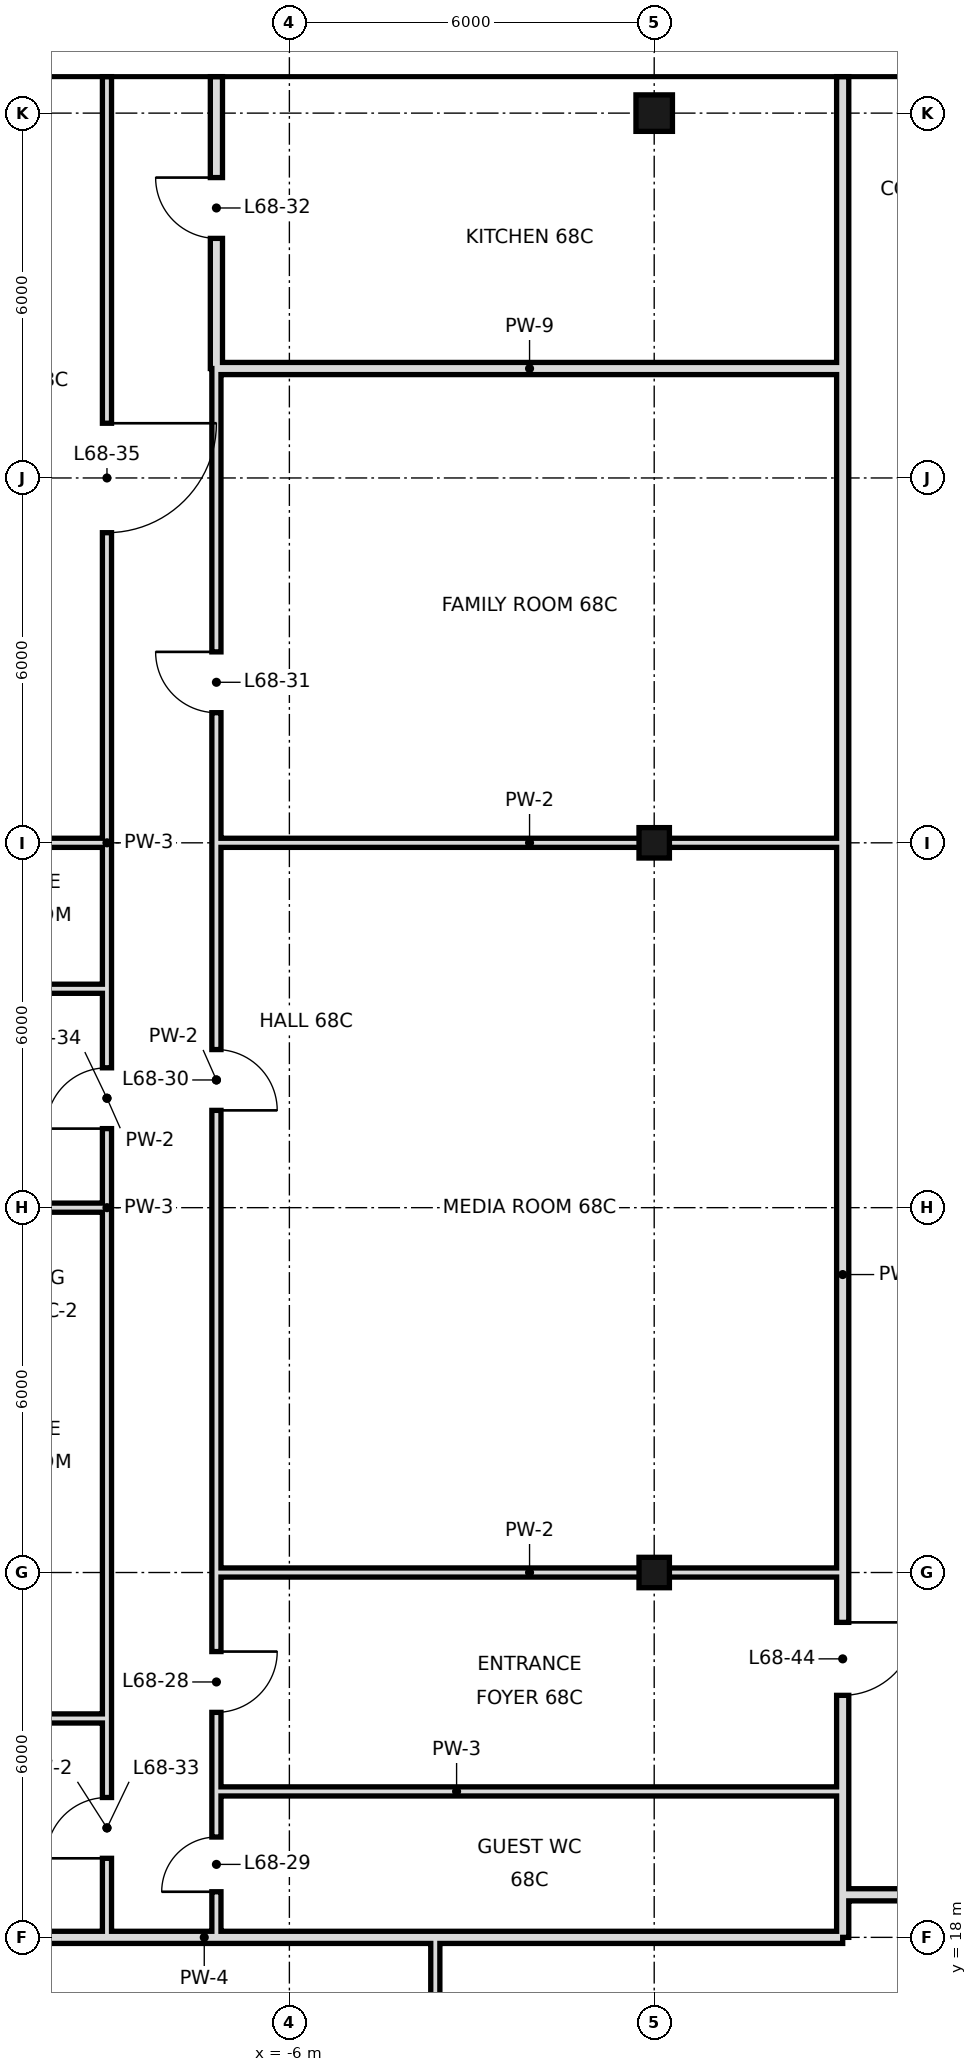
"""IFC4 building model, lengths in metres.
Left out: names, types, materials, properties, quantities, classifications, styles, units other than length and angle.
Written with IfcOpenShell. Run it as: python <this file> out.ifc"""

import sys

from ifc_helpers import new_model, si_unit, direction, frame, frame_2d, origin, origin_2d, place, context, subcontext, project, spatial, rectangle, hollow_rectangle, extrude, element, fill, save


model = new_model("IFC4")
c1 = context("Model", 3, precision=1e-05, world=origin(), true_north=direction((0.0, 1.0)))
c2 = subcontext(c1, "Body", "Model", "MODEL_VIEW")
j1 = project(units=[si_unit("LENGTHUNIT", "METRE"), si_unit("PLANEANGLEUNIT", "RADIAN")], contexts=[c1])
p1 = place(None, origin())
s1 = spatial("IfcSite", under=j1, at=p1, CompositionType="ELEMENT")
p2 = place(p1, origin())
s2 = spatial("IfcBuilding", under=s1, at=p2, CompositionType="ELEMENT")
p3 = place(p2, frame((0.0, 0.0, 290.8)))
s3 = spatial("IfcBuildingStorey", under=s2, at=p3, CompositionType="ELEMENT", Elevation=290.8)
for number, where, z_axis, x_axis in (
    (1, (0.0, 24.0, 0.0), (0.0, 0.0, 1.0), (1.0, 0.0, 0.0)),
    (2, (0.0, 36.0, 0.0), (0.0, 0.0, 1.0), (1.0, 0.0, 0.0)),
):
    element("IfcColumn", number, at=place(p3, frame(where, z_axis=z_axis, x_axis=x_axis)), inside=s3, PredefinedType="COLUMN", context=c2, shape_type="SweptSolid", body=[
        extrude(hollow_rectangle(XDim=0.5, YDim=0.5, WallThickness=0.025, at=origin_2d()), origin(), (0.0, 0.0, 1.0), 3.6),
    ])
p4 = place(p3, frame((0.0, 48.0, 0.0), z_axis=(0.0, 0.0, 1.0), x_axis=(1.0, 0.0, 0.0)))
e3 = element("IfcColumn", 3, at=p4, inside=s3, PredefinedType="COLUMN", context=c2, shape_type="SweptSolid", body=[
    extrude(hollow_rectangle(XDim=0.6, YDim=0.6, WallThickness=0.028, at=origin_2d()), origin(), (0.0, 0.0, 1.0), 3.6),
])
p5 = place(p3, frame((-3.6, 10.8, 0.0), z_axis=(0.0, 0.0, 1.0), x_axis=(0.0, 1.0, 0.0)))
e4 = element("IfcWall", 4, at=p5, inside=s3, PredefinedType="PARTITIONING", context=c2, shape_type="SweptSolid", body=[
    extrude(rectangle(XDim=7.2, YDim=0.15, at=frame_2d((3.6, 0.0))), origin(), (0.0, 0.0, 1.0), 3.42),
])
p6 = place(p3, frame((-7.2, 43.8, 0.0), z_axis=(0.0, 0.0, 1.0), x_axis=(0.0, 1.0, 0.0)))
e5 = element("IfcWall", 5, at=p6, inside=s3, PredefinedType="SOLIDWALL", context=c2, shape_type="SweptSolid", body=[
    extrude(rectangle(XDim=4.8, YDim=0.2, at=frame_2d((2.4, 0.0))), origin(), (0.0, 0.0, 1.0), 2.72),
])
p7 = place(p6, frame((2.14, 0.0, 0.0)))
e6 = element("IfcOpeningElement", 6, at=p7, cuts=e5, PredefinedType="OPENING", context=c2, shape_type="SweptSolid", body=[
    extrude(rectangle(XDim=1.0, YDim=2.4, at=frame_2d((0.5, 1.2))), frame((0.0, 0.11, 0.0), z_axis=(0.0, -1.0, 0.0), x_axis=(1.0, 0.0, 0.0)), (0.0, 0.0, 1.0), 0.22),
])
p8 = place(p3, frame((-7.2, 20.4, 0.0), z_axis=(0.0, 0.0, 1.0), x_axis=(0.0, 1.0, 0.0)))
e7 = element("IfcWall", 7, at=p8, inside=s3, PredefinedType="PARTITIONING", context=c2, shape_type="SweptSolid", body=[
    extrude(rectangle(XDim=23.4, YDim=0.15, at=frame_2d((11.7, 0.0))), origin(), (0.0, 0.0, 1.0), 3.42),
])
p9 = place(p8, frame((1.3, 0.0, 0.0)))
e8 = element("IfcOpeningElement", 8, at=p9, cuts=e7, PredefinedType="OPENING", context=c2, shape_type="SweptSolid", body=[
    extrude(rectangle(XDim=1.0, YDim=2.4, at=frame_2d((0.5, 1.2))), frame((0.0, 0.085, 0.0), z_axis=(0.0, -1.0, 0.0), x_axis=(1.0, 0.0, 0.0)), (0.0, 0.0, 1.0), 0.17),
])
p10 = place(p8, frame((11.2, 0.0, 0.0)))
e9 = element("IfcOpeningElement", 9, at=p10, cuts=e7, PredefinedType="OPENING", context=c2, shape_type="SweptSolid", body=[
    extrude(rectangle(XDim=1.0, YDim=2.4, at=frame_2d((0.5, 1.2))), frame((0.0, 0.085, 0.0), z_axis=(0.0, -1.0, 0.0), x_axis=(1.0, 0.0, 0.0)), (0.0, 0.0, 1.0), 0.17),
])
p11 = place(p8, frame((17.74, 0.0, 0.0)))
e10 = element("IfcOpeningElement", 10, at=p11, cuts=e7, PredefinedType="OPENING", context=c2, shape_type="SweptSolid", body=[
    extrude(rectangle(XDim=1.0, YDim=2.4, at=frame_2d((0.5, 1.2))), frame((0.0, 0.085, 0.0), z_axis=(0.0, -1.0, 0.0), x_axis=(1.0, 0.0, 0.0)), (0.0, 0.0, 1.0), 0.17),
])
p12 = place(p3, frame((-7.2, 18.0, 0.0), z_axis=(0.0, 0.0, 1.0), x_axis=(0.0, 1.0, 0.0)))
e11 = element("IfcWall", 11, at=p12, inside=s3, PredefinedType="PARTITIONING", context=c2, shape_type="SweptSolid", body=[
    extrude(rectangle(XDim=2.4, YDim=0.15, at=frame_2d((1.2, 0.0))), origin(), (0.0, 0.0, 1.0), 3.42),
])
p13 = place(p12, frame((0.75, 0.0, 0.0)))
e12 = element("IfcOpeningElement", 12, at=p13, cuts=e11, PredefinedType="OPENING", context=c2, shape_type="SweptSolid", body=[
    extrude(rectangle(XDim=0.9, YDim=2.4, at=frame_2d((0.45, 1.2))), frame((0.0, 0.085, 0.0), z_axis=(0.0, -1.0, 0.0), x_axis=(1.0, 0.0, 0.0)), (0.0, 0.0, 1.0), 0.17),
])
p14 = place(p3, frame((-9.0, 18.0, 0.0), z_axis=(0.0, 0.0, 1.0), x_axis=(0.0, 1.0, 0.0)))
e13 = element("IfcWall", 13, at=p14, inside=s3, PredefinedType="PARTITIONING", context=c2, shape_type="SweptSolid", body=[
    extrude(rectangle(XDim=3.6, YDim=0.15, at=frame_2d((1.8, 0.0))), origin(), (0.0, 0.0, 1.0), 3.42),
])
p15 = place(p14, frame((1.3, 0.0, 0.0)))
e14 = element("IfcOpeningElement", 14, at=p15, cuts=e13, PredefinedType="OPENING", context=c2, shape_type="SweptSolid", body=[
    extrude(rectangle(XDim=1.0, YDim=2.4, at=frame_2d((0.5, 1.2))), frame((0.0, 0.085, 0.0), z_axis=(0.0, -1.0, 0.0), x_axis=(1.0, 0.0, 0.0)), (0.0, 0.0, 1.0), 0.17),
])
p16 = place(p3, frame((-9.0, 30.0, 0.0), z_axis=(0.0, 0.0, 1.0), x_axis=(0.0, 1.0, 0.0)))
e15 = element("IfcWall", 15, at=p16, inside=s3, PredefinedType="PARTITIONING", context=c2, shape_type="SweptSolid", body=[
    extrude(rectangle(XDim=3.6, YDim=0.15, at=frame_2d((1.8, 0.0))), origin(), (0.0, 0.0, 1.0), 3.42),
])
p17 = place(p16, frame((1.3, 0.0, 0.0)))
e16 = element("IfcOpeningElement", 16, at=p17, cuts=e15, PredefinedType="OPENING", context=c2, shape_type="SweptSolid", body=[
    extrude(rectangle(XDim=1.0, YDim=2.4, at=frame_2d((0.5, 1.2))), frame((0.0, 0.085, 0.0), z_axis=(0.0, -1.0, 0.0), x_axis=(1.0, 0.0, 0.0)), (0.0, 0.0, 1.0), 0.17),
])
p18 = place(p3, frame((-9.0, 36.0, 0.0), z_axis=(0.0, 0.0, 1.0), x_axis=(0.0, 1.0, 0.0)))
e17 = element("IfcWall", 17, at=p18, inside=s3, PredefinedType="PARTITIONING", context=c2, shape_type="SweptSolid", body=[
    extrude(rectangle(XDim=12.6, YDim=0.15, at=frame_2d((6.3, 0.0))), origin(), (0.0, 0.0, 1.0), 3.42),
])
p19 = place(p18, frame((5.1, 0.0, 0.0)))
e18 = element("IfcOpeningElement", 18, at=p19, cuts=e17, PredefinedType="OPENING", context=c2, shape_type="SweptSolid", body=[
    extrude(rectangle(XDim=1.8, YDim=2.4, at=frame_2d((0.9, 1.2))), frame((0.0, 0.085, 0.0), z_axis=(0.0, -1.0, 0.0), x_axis=(1.0, 0.0, 0.0)), (0.0, 0.0, 1.0), 0.17),
])
p20 = place(p3, frame((-9.0, 21.6, 0.0), z_axis=(0.0, 0.0, 1.0), x_axis=(0.0, 1.0, 0.0)))
e19 = element("IfcWall", 19, at=p20, inside=s3, PredefinedType="PARTITIONING", context=c2, shape_type="SweptSolid", body=[
    extrude(rectangle(XDim=8.4, YDim=0.15, at=frame_2d((4.2, 0.0))), origin(), (0.0, 0.0, 1.0), 3.42),
])
p21 = place(p3, frame((-9.0, 33.6, 0.0), z_axis=(0.0, 0.0, 1.0), x_axis=(0.0, 1.0, 0.0)))
e20 = element("IfcWall", 20, at=p21, inside=s3, PredefinedType="PARTITIONING", context=c2, shape_type="SweptSolid", body=[
    extrude(rectangle(XDim=2.4, YDim=0.15, at=frame_2d((1.2, 0.0))), origin(), (0.0, 0.0, 1.0), 3.42),
])
p22 = place(p3, frame((3.1, 18.7, 0.0), z_axis=(0.0, 0.0, 1.0), x_axis=(0.0, 1.0, 0.0)))
e21 = element("IfcWall", 21, at=p22, inside=s3, PredefinedType="SOLIDWALL", context=c2, shape_type="SweptSolid", body=[
    extrude(rectangle(XDim=25.1, YDim=0.2, at=frame_2d((12.55, 0.0))), origin(), (0.0, 0.0, 1.0), 2.97),
])
p23 = place(p22, frame((3.28, 0.0, 0.0)))
e22 = element("IfcOpeningElement", 22, at=p23, cuts=e21, PredefinedType="OPENING", context=c2, shape_type="SweptSolid", body=[
    extrude(rectangle(XDim=1.2, YDim=2.4, at=frame_2d((0.6, 1.2))), frame((0.0, 0.11, 0.0), z_axis=(0.0, -1.0, 0.0), x_axis=(1.0, 0.0, 0.0)), (0.0, 0.0, 1.0), 0.22),
])
p24 = place(p3, frame((3.1, 43.8, 0.0), z_axis=(0.0, 0.0, 1.0), x_axis=(0.0, 1.0, 0.0)))
e23 = element("IfcWall", 23, at=p24, inside=s3, PredefinedType="SOLIDWALL", context=c2, shape_type="SweptSolid", body=[
    extrude(rectangle(XDim=4.8, YDim=0.2, at=frame_2d((2.4, 0.0))), origin(), (0.0, 0.0, 1.0), 2.72),
])
p25 = place(p3, frame((3.1, 18.0, 0.0), z_axis=(0.0, 0.0, 1.0), x_axis=(0.0, 1.0, 0.0)))
e24 = element("IfcWall", 24, at=p25, inside=s3, PredefinedType="SOLIDWALL", context=c2, shape_type="SweptSolid", body=[
    extrude(rectangle(XDim=0.7, YDim=0.2, at=frame_2d((0.35, 0.0))), origin(), (0.0, 0.0, 1.0), 2.97),
])
p26 = place(p3, frame((-18.6, 18.0, 0.0), z_axis=(0.0, 0.0, 1.0), x_axis=(1.0, 0.0, 0.0)))
e25 = element("IfcWall", 25, at=p26, inside=s3, PredefinedType="SOLIDWALL", context=c2, shape_type="SweptSolid", body=[
    extrude(rectangle(XDim=21.7, YDim=0.2, at=frame_2d((10.85, 0.0))), origin(), (0.0, 0.0, 1.0), 2.72),
])
p27 = place(p3, frame((3.1, 18.7, 0.0), z_axis=(0.0, 0.0, 1.0), x_axis=(1.0, 0.0, 0.0)))
e26 = element("IfcWall", 26, at=p27, inside=s3, PredefinedType="SOLIDWALL", context=c2, shape_type="SweptSolid", body=[
    extrude(rectangle(XDim=4.7, YDim=0.2, at=frame_2d((2.35, 0.0))), origin(), (0.0, 0.0, 1.0), 2.72),
])
p28 = place(p3, frame((-7.2, 20.4, 0.0), z_axis=(0.0, 0.0, 1.0), x_axis=(1.0, 0.0, 0.0)))
e27 = element("IfcWall", 27, at=p28, inside=s3, PredefinedType="PARTITIONING", context=c2, shape_type="SweptSolid", body=[
    extrude(rectangle(XDim=10.3, YDim=0.15, at=frame_2d((5.15, 0.0))), origin(), (0.0, 0.0, 1.0), 3.42),
])
p29 = place(p3, frame((-12.0, 21.6, 0.0), z_axis=(0.0, 0.0, 1.0), x_axis=(1.0, 0.0, 0.0)))
e28 = element("IfcWall", 28, at=p29, inside=s3, PredefinedType="PARTITIONING", context=c2, shape_type="SweptSolid", body=[
    extrude(rectangle(XDim=3.0, YDim=0.15, at=frame_2d((1.5, 0.0))), origin(), (0.0, 0.0, 1.0), 3.42),
])
p30 = place(p3, frame((-7.2, 24.0, 0.0), z_axis=(0.0, 0.0, 1.0), x_axis=(1.0, 0.0, 0.0)))
e29 = element("IfcWall", 29, at=p30, inside=s3, PredefinedType="PARTITIONING", context=c2, shape_type="SweptSolid", body=[
    extrude(rectangle(XDim=10.3, YDim=0.15, at=frame_2d((5.15, 0.0))), origin(), (0.0, 0.0, 1.0), 2.72),
])
p31 = place(p3, frame((-12.0, 30.0, 0.0), z_axis=(0.0, 0.0, 1.0), x_axis=(1.0, 0.0, 0.0)))
e30 = element("IfcWall", 30, at=p31, inside=s3, PredefinedType="PARTITIONING", context=c2, shape_type="SweptSolid", body=[
    extrude(rectangle(XDim=3.0, YDim=0.15, at=frame_2d((1.5, 0.0))), origin(), (0.0, 0.0, 1.0), 2.72),
])
p32 = place(p3, frame((-12.0, 33.6, 0.0), z_axis=(0.0, 0.0, 1.0), x_axis=(1.0, 0.0, 0.0)))
e31 = element("IfcWall", 31, at=p32, inside=s3, PredefinedType="PARTITIONING", context=c2, shape_type="SweptSolid", body=[
    extrude(rectangle(XDim=3.0, YDim=0.15, at=frame_2d((1.5, 0.0))), origin(), (0.0, 0.0, 1.0), 3.42),
])
p33 = place(p3, frame((-7.2, 36.0, 0.0), z_axis=(0.0, 0.0, 1.0), x_axis=(1.0, 0.0, 0.0)))
e32 = element("IfcWall", 32, at=p33, inside=s3, PredefinedType="PARTITIONING", context=c2, shape_type="SweptSolid", body=[
    extrude(rectangle(XDim=10.3, YDim=0.15, at=frame_2d((5.15, 0.0))), origin(), (0.0, 0.0, 1.0), 2.72),
])
p34 = place(p3, frame((-12.0, 36.0, 0.0), z_axis=(0.0, 0.0, 1.0), x_axis=(1.0, 0.0, 0.0)))
e33 = element("IfcWall", 33, at=p34, inside=s3, PredefinedType="PARTITIONING", context=c2, shape_type="SweptSolid", body=[
    extrude(rectangle(XDim=3.0, YDim=0.15, at=frame_2d((1.5, 0.0))), origin(), (0.0, 0.0, 1.0), 2.72),
])
p35 = place(p3, frame((-7.2, 43.8, 0.0), z_axis=(0.0, 0.0, 1.0), x_axis=(1.0, 0.0, 0.0)))
e34 = element("IfcWall", 34, at=p35, inside=s3, PredefinedType="SOLIDWALL", context=c2, shape_type="SweptSolid", body=[
    extrude(rectangle(XDim=10.3, YDim=0.2, at=frame_2d((5.15, 0.0))), origin(), (0.0, 0.0, 1.0), 2.72),
])
p36 = place(p9, origin())
e35 = element("IfcDoor", 35, at=p36, inside=s3, OperationType="SINGLE_SWING_RIGHT", PredefinedType="DOOR", context=c2, shape_type="SweptSolid", body=[
    extrude(rectangle(XDim=1.0, YDim=2.4, at=frame_2d((0.5, 1.2))), frame((0.0, 0.025, 0.0), z_axis=(0.0, -1.0, 0.0), x_axis=(1.0, 0.0, 0.0)), (0.0, 0.0, 1.0), 0.05),
])
fill(e8, e35)
p37 = place(p13, origin())
e36 = element("IfcDoor", 36, at=p37, inside=s3, OperationType="SINGLE_SWING_LEFT", PredefinedType="DOOR", context=c2, shape_type="SweptSolid", body=[
    extrude(rectangle(XDim=0.9, YDim=2.4, at=frame_2d((0.45, 1.2))), frame((0.0, 0.025, 0.0), z_axis=(0.0, -1.0, 0.0), x_axis=(1.0, 0.0, 0.0)), (0.0, 0.0, 1.0), 0.05),
])
fill(e12, e36)
p38 = place(p10, frame((1.0, 0.0, 0.0), z_axis=(0.0, 0.0, 1.0), x_axis=(-1.0, 0.0, 0.0)))
e37 = element("IfcDoor", 37, at=p38, inside=s3, OperationType="SINGLE_SWING_RIGHT", PredefinedType="DOOR", context=c2, shape_type="SweptSolid", body=[
    extrude(rectangle(XDim=1.0, YDim=2.4, at=frame_2d((0.5, 1.2))), frame((0.0, 0.025, 0.0), z_axis=(0.0, -1.0, 0.0), x_axis=(1.0, 0.0, 0.0)), (0.0, 0.0, 1.0), 0.05),
])
fill(e9, e37)
p39 = place(p11, frame((1.0, 0.0, 0.0), z_axis=(0.0, 0.0, 1.0), x_axis=(-1.0, 0.0, 0.0)))
e38 = element("IfcDoor", 38, at=p39, inside=s3, OperationType="SINGLE_SWING_LEFT", PredefinedType="DOOR", context=c2, shape_type="SweptSolid", body=[
    extrude(rectangle(XDim=1.0, YDim=2.4, at=frame_2d((0.5, 1.2))), frame((0.0, 0.025, 0.0), z_axis=(0.0, -1.0, 0.0), x_axis=(1.0, 0.0, 0.0)), (0.0, 0.0, 1.0), 0.05),
])
fill(e10, e38)
p40 = place(p7, frame((1.0, 0.0, 0.0), z_axis=(0.0, 0.0, 1.0), x_axis=(-1.0, 0.0, 0.0)))
e39 = element("IfcDoor", 39, at=p40, inside=s3, OperationType="SINGLE_SWING_LEFT", PredefinedType="DOOR", context=c2, shape_type="SweptSolid", body=[
    extrude(rectangle(XDim=1.0, YDim=2.4, at=frame_2d((0.5, 1.2))), frame((0.0, 0.025, 0.0), z_axis=(0.0, -1.0, 0.0), x_axis=(1.0, 0.0, 0.0)), (0.0, 0.0, 1.0), 0.05),
])
fill(e6, e39)
p41 = place(p15, origin())
e40 = element("IfcDoor", 40, at=p41, inside=s3, OperationType="SINGLE_SWING_LEFT", PredefinedType="DOOR", context=c2, shape_type="SweptSolid", body=[
    extrude(rectangle(XDim=1.0, YDim=2.4, at=frame_2d((0.5, 1.2))), frame((0.0, 0.025, 0.0), z_axis=(0.0, -1.0, 0.0), x_axis=(1.0, 0.0, 0.0)), (0.0, 0.0, 1.0), 0.05),
])
fill(e14, e40)
p42 = place(p17, origin())
e41 = element("IfcDoor", 41, at=p42, inside=s3, OperationType="SINGLE_SWING_LEFT", PredefinedType="DOOR", context=c2, shape_type="SweptSolid", body=[
    extrude(rectangle(XDim=1.0, YDim=2.4, at=frame_2d((0.5, 1.2))), frame((0.0, 0.025, 0.0), z_axis=(0.0, -1.0, 0.0), x_axis=(1.0, 0.0, 0.0)), (0.0, 0.0, 1.0), 0.05),
])
fill(e16, e41)
p43 = place(p19, origin())
e42 = element("IfcDoor", 42, at=p43, inside=s3, OperationType="SINGLE_SWING_RIGHT", PredefinedType="DOOR", context=c2, shape_type="SweptSolid", body=[
    extrude(rectangle(XDim=1.8, YDim=2.4, at=frame_2d((0.9, 1.2))), frame((0.0, 0.025, 0.0), z_axis=(0.0, -1.0, 0.0), x_axis=(1.0, 0.0, 0.0)), (0.0, 0.0, 1.0), 0.05),
])
fill(e18, e42)
p44 = place(p23, origin())
e43 = element("IfcDoor", 43, at=p44, inside=s3, OperationType="SINGLE_SWING_RIGHT", PredefinedType="DOOR", context=c2, shape_type="SweptSolid", body=[
    extrude(rectangle(XDim=1.2, YDim=2.4, at=frame_2d((0.6, 1.2))), frame((0.0, 0.025, 0.0), z_axis=(0.0, -1.0, 0.0), x_axis=(1.0, 0.0, 0.0)), (0.0, 0.0, 1.0), 0.05),
])
fill(e22, e43)
save(model, sys.argv[1])
